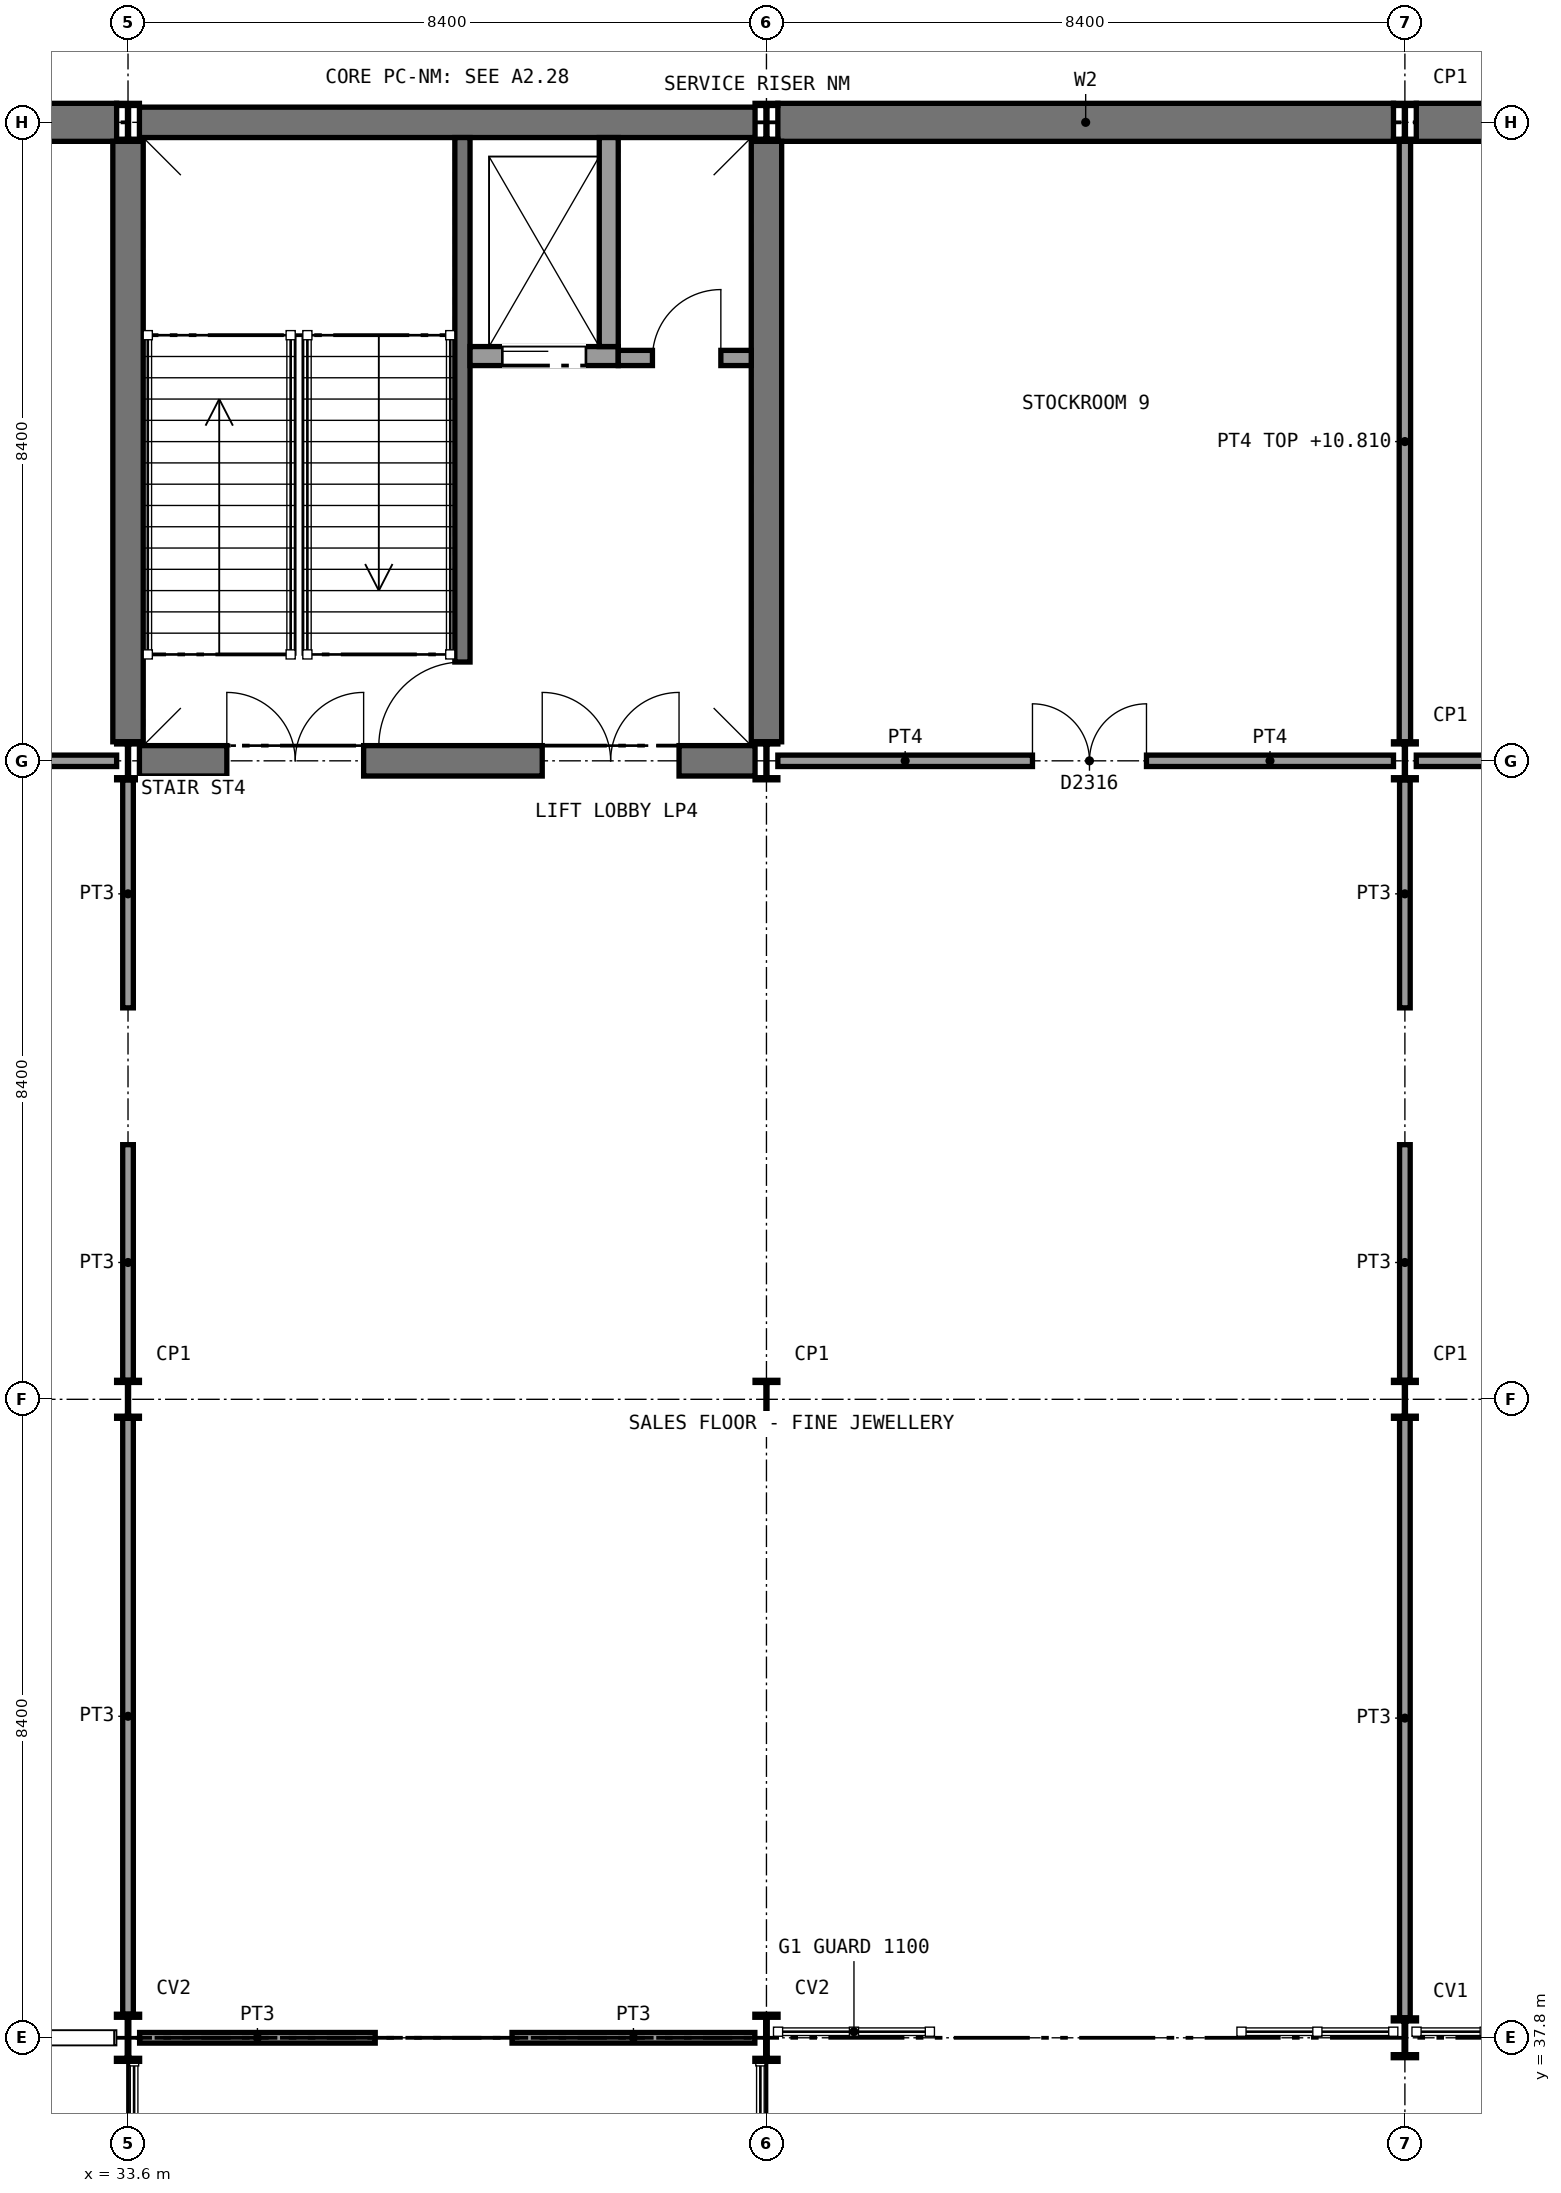
"""IFC4 building model, lengths in metres.
Left out: names, types, materials, properties, quantities, classifications, styles, units other than length and angle.
Written with IfcOpenShell. Run it as: python <this file> out.ifc"""

import sys

from ifc_helpers import new_model, si_unit, direction, frame, frame_2d, origin, origin_2d, place, context, subcontext, project, spatial, rectangle, i_section, extrude, element, fill, save


model = new_model("IFC4")
c1 = context("Model", 3, precision=1e-05, world=origin(), true_north=direction((0.0, 1.0)))
c2 = subcontext(c1, "Body", "Model", "MODEL_VIEW")
j1 = project(units=[si_unit("LENGTHUNIT", "METRE"), si_unit("PLANEANGLEUNIT", "RADIAN")], contexts=[c1])
p1 = place(None, origin())
s1 = spatial("IfcSite", under=j1, at=p1, CompositionType="ELEMENT")
p2 = place(p1, origin())
s2 = spatial("IfcBuilding", under=s1, at=p2, CompositionType="ELEMENT")
p3 = place(p2, frame((0.0, 0.0, 6.0)))
s3 = spatial("IfcBuildingStorey", under=s2, at=p3, CompositionType="ELEMENT", Elevation=6.0)
p4 = place(p3, frame((25.35, 63.0, 0.0), z_axis=(0.0, 0.0, 1.0), x_axis=(1.0, 0.0, 0.0)))
e1 = element("IfcWall", 1, at=p4, inside=s3, PredefinedType="SHEAR", context=c2, shape_type="SweptSolid", body=[
    extrude(rectangle(XDim=8.1, YDim=0.5, at=frame_2d((4.05, 0.0))), origin(), (0.0, 0.0, 1.0), 5.25),
])
p5 = place(p3, frame((42.15, 63.0, 0.0), z_axis=(0.0, 0.0, 1.0), x_axis=(1.0, 0.0, 0.0)))
e2 = element("IfcWall", 2, at=p5, inside=s3, PredefinedType="SHEAR", context=c2, shape_type="SweptSolid", body=[
    extrude(rectangle(XDim=8.1, YDim=0.5, at=frame_2d((4.05, 0.0))), origin(), (0.0, 0.0, 1.0), 5.25),
])
p6 = place(p3, frame((50.55, 63.0, 0.0), z_axis=(0.0, 0.0, 1.0), x_axis=(1.0, 0.0, 0.0)))
e3 = element("IfcWall", 3, at=p6, inside=s3, PredefinedType="SHEAR", context=c2, shape_type="SweptSolid", body=[
    extrude(rectangle(XDim=8.1, YDim=0.5, at=frame_2d((4.05, 0.0))), origin(), (0.0, 0.0, 1.0), 5.25),
])
p7 = place(p3, frame((33.75, 63.0, 0.0), z_axis=(0.0, 0.0, 1.0), x_axis=(1.0, 0.0, 0.0)))
e4 = element("IfcWall", 4, at=p7, inside=s3, PredefinedType="SHEAR", context=c2, shape_type="SweptSolid", body=[
    extrude(rectangle(XDim=8.1, YDim=0.4, at=frame_2d((4.05, 0.0))), origin(), (0.0, 0.0, 1.0), 5.25),
])
p8 = place(p3, frame((33.75, 54.6, 0.0), z_axis=(0.0, 0.0, 1.0), x_axis=(1.0, 0.0, 0.0)))
e5 = element("IfcWall", 5, at=p8, inside=s3, PredefinedType="SHEAR", context=c2, shape_type="SweptSolid", body=[
    extrude(rectangle(XDim=8.1, YDim=0.4, at=frame_2d((4.05, 0.0))), origin(), (0.0, 0.0, 1.0), 5.25),
])
p9 = place(p8, frame((1.15, 0.0, 0.0)))
e6 = element("IfcOpeningElement", 6, at=p9, cuts=e5, PredefinedType="OPENING", context=c2, shape_type="SweptSolid", body=[
    extrude(rectangle(XDim=1.8, YDim=2.1, at=frame_2d((0.9, 1.05))), frame((0.0, 0.21, 0.0), z_axis=(0.0, -1.0, 0.0), x_axis=(1.0, 0.0, 0.0)), (0.0, 0.0, 1.0), 0.42),
])
p10 = place(p8, frame((5.3, 0.0, 0.0)))
e7 = element("IfcOpeningElement", 7, at=p10, cuts=e5, PredefinedType="OPENING", context=c2, shape_type="SweptSolid", body=[
    extrude(rectangle(XDim=1.8, YDim=2.1, at=frame_2d((0.9, 1.05))), frame((0.0, 0.21, 0.0), z_axis=(0.0, -1.0, 0.0), x_axis=(1.0, 0.0, 0.0)), (0.0, 0.0, 1.0), 0.42),
])
for number, where, z_axis, x_axis in (
    (8, (33.6, 54.85, 0.0), (0.0, 0.0, 1.0), (0.0, 1.0, 0.0)),
    (9, (42.0, 54.85, 0.0), (0.0, 0.0, 1.0), (0.0, 1.0, 0.0)),
):
    element("IfcWall", number, at=place(p3, frame(where, z_axis=z_axis, x_axis=x_axis)), inside=s3, PredefinedType="SHEAR", context=c2, shape_type="SweptSolid", body=[
        extrude(rectangle(XDim=7.9, YDim=0.4, at=frame_2d((3.95, 0.0))), origin(), (0.0, 0.0, 1.0), 5.25),
    ])
p11 = place(p3, frame((33.6, 37.8, 0.0), z_axis=(0.0, 0.0, 1.0), x_axis=(1.0, 0.0, 0.0)))
e10 = element("IfcColumn", 10, at=p11, inside=s3, PredefinedType="COLUMN", context=c2, shape_type="SweptSolid", body=[
    extrude(i_section(OverallWidth=0.305, OverallDepth=0.62, WebThickness=0.021, FlangeThickness=0.04, FilletRadius=0.027, at=origin_2d()), origin(), (0.0, 0.0, 1.0), 5.4),
])
for number, where, z_axis, x_axis in (
    (11, (33.6, 46.2, 0.0), (0.0, 0.0, 1.0), (1.0, 0.0, 0.0)),
    (12, (33.6, 54.6, 0.0), (0.0, 0.0, 1.0), (1.0, 0.0, 0.0)),
    (13, (33.6, 63.0, 0.0), (0.0, 0.0, 1.0), (1.0, 0.0, 0.0)),
):
    element("IfcColumn", number, at=place(p3, frame(where, z_axis=z_axis, x_axis=x_axis)), inside=s3, PredefinedType="COLUMN", context=c2, shape_type="SweptSolid", body=[
        extrude(i_section(OverallWidth=0.3, OverallDepth=0.5, WebThickness=0.014, FlangeThickness=0.028, FilletRadius=0.027, at=origin_2d()), origin(), (0.0, 0.0, 1.0), 5.4),
    ])
p12 = place(p3, frame((42.0, 37.8, 0.0), z_axis=(0.0, 0.0, 1.0), x_axis=(1.0, 0.0, 0.0)))
e14 = element("IfcColumn", 14, at=p12, inside=s3, PredefinedType="COLUMN", context=c2, shape_type="SweptSolid", body=[
    extrude(i_section(OverallWidth=0.305, OverallDepth=0.62, WebThickness=0.021, FlangeThickness=0.04, FilletRadius=0.027, at=origin_2d()), origin(), (0.0, 0.0, 1.0), 5.4),
])
for number, where, z_axis, x_axis in (
    (15, (42.0, 46.2, 0.0), (0.0, 0.0, 1.0), (1.0, 0.0, 0.0)),
    (16, (42.0, 54.6, 0.0), (0.0, 0.0, 1.0), (1.0, 0.0, 0.0)),
    (17, (42.0, 63.0, 0.0), (0.0, 0.0, 1.0), (1.0, 0.0, 0.0)),
):
    element("IfcColumn", number, at=place(p3, frame(where, z_axis=z_axis, x_axis=x_axis)), inside=s3, PredefinedType="COLUMN", context=c2, shape_type="SweptSolid", body=[
        extrude(i_section(OverallWidth=0.3, OverallDepth=0.5, WebThickness=0.014, FlangeThickness=0.028, FilletRadius=0.027, at=origin_2d()), origin(), (0.0, 0.0, 1.0), 5.4),
    ])
p13 = place(p3, frame((50.4, 37.8, 0.0), z_axis=(0.0, 0.0, 1.0), x_axis=(1.0, 0.0, 0.0)))
e18 = element("IfcColumn", 18, at=p13, inside=s3, PredefinedType="COLUMN", context=c2, shape_type="SweptSolid", body=[
    extrude(i_section(OverallWidth=0.306, OverallDepth=0.524, WebThickness=0.021, FlangeThickness=0.04, FilletRadius=0.027, at=origin_2d()), origin(), (0.0, 0.0, 1.0), 5.4),
])
for number, where, z_axis, x_axis in (
    (19, (50.4, 46.2, 0.0), (0.0, 0.0, 1.0), (1.0, 0.0, 0.0)),
    (20, (50.4, 54.6, 0.0), (0.0, 0.0, 1.0), (1.0, 0.0, 0.0)),
    (21, (50.4, 63.0, 0.0), (0.0, 0.0, 1.0), (1.0, 0.0, 0.0)),
):
    element("IfcColumn", number, at=place(p3, frame(where, z_axis=z_axis, x_axis=x_axis)), inside=s3, PredefinedType="COLUMN", context=c2, shape_type="SweptSolid", body=[
        extrude(i_section(OverallWidth=0.3, OverallDepth=0.5, WebThickness=0.014, FlangeThickness=0.028, FilletRadius=0.027, at=origin_2d()), origin(), (0.0, 0.0, 1.0), 5.4),
    ])
p14 = place(p3, frame((25.35, 54.6, 0.0), z_axis=(0.0, 0.0, 1.0), x_axis=(1.0, 0.0, 0.0)))
e22 = element("IfcWall", 22, at=p14, inside=s3, PredefinedType="SOLIDWALL", context=c2, shape_type="SweptSolid", body=[
    extrude(rectangle(XDim=8.1, YDim=0.15, at=frame_2d((4.05, 0.0))), origin(), (0.0, 0.0, 1.0), 4.92),
])
p15 = place(p14, frame((3.35, 0.0, 0.0)))
e23 = element("IfcOpeningElement", 23, at=p15, cuts=e22, PredefinedType="OPENING", context=c2, shape_type="SweptSolid", body=[
    extrude(rectangle(XDim=1.5, YDim=2.1, at=frame_2d((0.75, 1.05))), frame((0.0, 0.085, 0.0), z_axis=(0.0, -1.0, 0.0), x_axis=(1.0, 0.0, 0.0)), (0.0, 0.0, 1.0), 0.17),
])
p16 = place(p3, frame((50.4, 54.85, 0.0), z_axis=(0.0, 0.0, 1.0), x_axis=(0.0, 1.0, 0.0)))
e24 = element("IfcWall", 24, at=p16, inside=s3, PredefinedType="SOLIDWALL", context=c2, shape_type="SweptSolid", body=[
    extrude(rectangle(XDim=7.9, YDim=0.15, at=frame_2d((3.95, 0.0))), origin(), (0.0, 0.0, 1.0), 4.81),
])
p17 = place(p3, frame((42.15, 54.6, 0.0), z_axis=(0.0, 0.0, 1.0), x_axis=(1.0, 0.0, 0.0)))
e25 = element("IfcWall", 25, at=p17, inside=s3, PredefinedType="SOLIDWALL", context=c2, shape_type="SweptSolid", body=[
    extrude(rectangle(XDim=8.1, YDim=0.15, at=frame_2d((4.05, 0.0))), origin(), (0.0, 0.0, 1.0), 4.92),
])
p18 = place(p17, frame((3.35, 0.0, 0.0)))
e26 = element("IfcOpeningElement", 26, at=p18, cuts=e25, PredefinedType="OPENING", context=c2, shape_type="SweptSolid", body=[
    extrude(rectangle(XDim=1.5, YDim=2.1, at=frame_2d((0.75, 1.05))), frame((0.0, 0.085, 0.0), z_axis=(0.0, -1.0, 0.0), x_axis=(1.0, 0.0, 0.0)), (0.0, 0.0, 1.0), 0.17),
])
p19 = place(p3, frame((50.55, 54.6, 0.0), z_axis=(0.0, 0.0, 1.0), x_axis=(1.0, 0.0, 0.0)))
e27 = element("IfcWall", 27, at=p19, inside=s3, PredefinedType="SOLIDWALL", context=c2, shape_type="SweptSolid", body=[
    extrude(rectangle(XDim=8.1, YDim=0.15, at=frame_2d((4.05, 0.0))), origin(), (0.0, 0.0, 1.0), 4.92),
])
p20 = place(p19, frame((3.35, 0.0, 0.0)))
e28 = element("IfcOpeningElement", 28, at=p20, cuts=e27, PredefinedType="OPENING", context=c2, shape_type="SweptSolid", body=[
    extrude(rectangle(XDim=1.5, YDim=2.1, at=frame_2d((0.75, 1.05))), frame((0.0, 0.085, 0.0), z_axis=(0.0, -1.0, 0.0), x_axis=(1.0, 0.0, 0.0)), (0.0, 0.0, 1.0), 0.17),
])
p21 = place(p3, frame((33.6, 38.11, 0.0), z_axis=(0.0, 0.0, 1.0), x_axis=(0.0, 1.0, 0.0)))
e29 = element("IfcWall", 29, at=p21, inside=s3, PredefinedType="PARTITIONING", context=c2, shape_type="SweptSolid", body=[
    extrude(rectangle(XDim=7.84, YDim=0.14, at=frame_2d((3.92, 0.0))), origin(), (0.0, 0.0, 1.0), 4.81),
])
p22 = place(p3, frame((33.6, 46.45, 0.0), z_axis=(0.0, 0.0, 1.0), x_axis=(0.0, 1.0, 0.0)))
e30 = element("IfcWall", 30, at=p22, inside=s3, PredefinedType="PARTITIONING", context=c2, shape_type="SweptSolid", body=[
    extrude(rectangle(XDim=3.1, YDim=0.14, at=frame_2d((1.55, 0.0))), origin(), (0.0, 0.0, 1.0), 4.81),
])
p23 = place(p3, frame((33.6, 51.35, 0.0), z_axis=(0.0, 0.0, 1.0), x_axis=(0.0, 1.0, 0.0)))
e31 = element("IfcWall", 31, at=p23, inside=s3, PredefinedType="PARTITIONING", context=c2, shape_type="SweptSolid", body=[
    extrude(rectangle(XDim=3.0, YDim=0.14, at=frame_2d((1.5, 0.0))), origin(), (0.0, 0.0, 1.0), 4.81),
])
p24 = place(p3, frame((50.4, 38.062, 0.0), z_axis=(0.0, 0.0, 1.0), x_axis=(0.0, 1.0, 0.0)))
e32 = element("IfcWall", 32, at=p24, inside=s3, PredefinedType="PARTITIONING", context=c2, shape_type="SweptSolid", body=[
    extrude(rectangle(XDim=7.888, YDim=0.14, at=frame_2d((3.944, 0.0))), origin(), (0.0, 0.0, 1.0), 4.81),
])
p25 = place(p3, frame((50.4, 46.45, 0.0), z_axis=(0.0, 0.0, 1.0), x_axis=(0.0, 1.0, 0.0)))
e33 = element("IfcWall", 33, at=p25, inside=s3, PredefinedType="PARTITIONING", context=c2, shape_type="SweptSolid", body=[
    extrude(rectangle(XDim=3.1, YDim=0.14, at=frame_2d((1.55, 0.0))), origin(), (0.0, 0.0, 1.0), 4.81),
])
p26 = place(p3, frame((50.4, 51.35, 0.0), z_axis=(0.0, 0.0, 1.0), x_axis=(0.0, 1.0, 0.0)))
e34 = element("IfcWall", 34, at=p26, inside=s3, PredefinedType="PARTITIONING", context=c2, shape_type="SweptSolid", body=[
    extrude(rectangle(XDim=3.0, YDim=0.14, at=frame_2d((1.5, 0.0))), origin(), (0.0, 0.0, 1.0), 4.81),
])
p27 = place(p3, frame((33.753, 37.8, 0.0), z_axis=(0.0, 0.0, 1.0), x_axis=(1.0, 0.0, 0.0)))
e35 = element("IfcWall", 35, at=p27, inside=s3, PredefinedType="PARTITIONING", context=c2, shape_type="SweptSolid", body=[
    extrude(rectangle(XDim=3.1, YDim=0.14, at=frame_2d((1.55, 0.0))), origin(), (0.0, 0.0, 1.0), 4.81),
])
p28 = place(p3, frame((38.653, 37.8, 0.0), z_axis=(0.0, 0.0, 1.0), x_axis=(1.0, 0.0, 0.0)))
e36 = element("IfcWall", 36, at=p28, inside=s3, PredefinedType="PARTITIONING", context=c2, shape_type="SweptSolid", body=[
    extrude(rectangle(XDim=3.195, YDim=0.14, at=frame_2d((1.597, 0.0))), origin(), (0.0, 0.0, 1.0), 4.81),
])
p29 = place(p3, frame((38.0, 62.8, 0.0), z_axis=(0.0, 0.0, 1.0), x_axis=(0.0, -1.0, 0.0)))
e37 = element("IfcWall", 37, at=p29, inside=s3, PredefinedType="SHEAR", context=c2, shape_type="SweptSolid", body=[
    extrude(rectangle(XDim=8.0, YDim=0.2, at=frame_2d((4.0, 0.0))), origin(), (0.0, 0.0, 1.0), 5.25),
])
p30 = place(p29, frame((6.9, 0.0, 0.0)))
e38 = element("IfcOpeningElement", 38, at=p30, cuts=e37, PredefinedType="OPENING", context=c2, shape_type="SweptSolid", body=[
    extrude(rectangle(XDim=1.11, YDim=2.1, at=frame_2d((0.555, 1.05))), frame((0.0, 0.11, 0.0), z_axis=(0.0, -1.0, 0.0), x_axis=(1.0, 0.0, 0.0)), (0.0, 0.0, 1.0), 0.22),
])
p31 = place(p3, frame((38.1, 59.925, 0.0), z_axis=(0.0, 0.0, 1.0), x_axis=(1.0, 0.0, 0.0)))
e39 = element("IfcWall", 39, at=p31, inside=s3, PredefinedType="SOLIDWALL", context=c2, shape_type="SweptSolid", body=[
    extrude(rectangle(XDim=1.95, YDim=0.25, at=frame_2d((0.975, 0.0))), origin(), (0.0, 0.0, 1.0), 5.4),
])
p32 = place(p31, frame((0.425, 0.0, 0.0)))
e40 = element("IfcOpeningElement", 40, at=p32, cuts=e39, PredefinedType="OPENING", context=c2, shape_type="SweptSolid", body=[
    extrude(rectangle(XDim=1.1, YDim=2.1, at=frame_2d((0.55, 1.05))), frame((0.0, 0.135, 0.0), z_axis=(0.0, -1.0, 0.0), x_axis=(1.0, 0.0, 0.0)), (0.0, 0.0, 1.0), 0.27),
])
p33 = place(p3, frame((39.925, 62.8, 0.0), z_axis=(0.0, 0.0, 1.0), x_axis=(0.0, -1.0, 0.0)))
e41 = element("IfcWall", 41, at=p33, inside=s3, PredefinedType="SOLIDWALL", context=c2, shape_type="SweptSolid", body=[
    extrude(rectangle(XDim=2.75, YDim=0.25, at=frame_2d((1.375, 0.0))), origin(), (0.0, 0.0, 1.0), 5.4),
])
p34 = place(p3, frame((40.05, 59.9, 0.0), z_axis=(0.0, 0.0, 1.0), x_axis=(1.0, 0.0, 0.0)))
e42 = element("IfcWall", 42, at=p34, inside=s3, PredefinedType="PARTITIONING", context=c2, shape_type="SweptSolid", body=[
    extrude(rectangle(XDim=1.75, YDim=0.2, at=frame_2d((0.875, 0.0))), origin(), (0.0, 0.0, 1.0), 5.25),
])
p35 = place(p34, frame((0.45, 0.0, 0.0)))
e43 = element("IfcOpeningElement", 43, at=p35, cuts=e42, PredefinedType="OPENING", context=c2, shape_type="SweptSolid", body=[
    extrude(rectangle(XDim=0.9, YDim=2.1, at=frame_2d((0.45, 1.05))), frame((0.0, 0.11, 0.0), z_axis=(0.0, -1.0, 0.0), x_axis=(1.0, 0.0, 0.0)), (0.0, 0.0, 1.0), 0.22),
])
p36 = place(p18, origin())
e44 = element("IfcDoor", 44, at=p36, inside=s3, OperationType="DOUBLE_DOOR_SINGLE_SWING", PredefinedType="DOOR", context=c2, shape_type="SweptSolid", body=[
    extrude(rectangle(XDim=1.5, YDim=2.1, at=frame_2d((0.75, 1.05))), frame((0.0, 0.025, 0.0), z_axis=(0.0, -1.0, 0.0), x_axis=(1.0, 0.0, 0.0)), (0.0, 0.0, 1.0), 0.05),
])
fill(e26, e44)
p37 = place(p30, frame((1.1, 0.0, 0.0), z_axis=(0.0, 0.0, 1.0), x_axis=(-1.0, 0.0, 0.0)))
e45 = element("IfcDoor", 45, at=p37, inside=s3, OperationType="SINGLE_SWING_LEFT", PredefinedType="DOOR", context=c2, shape_type="SweptSolid", body=[
    extrude(rectangle(XDim=1.1, YDim=2.1, at=frame_2d((0.55, 1.05))), frame((0.0, 0.025, 0.0), z_axis=(0.0, -1.0, 0.0), x_axis=(1.0, 0.0, 0.0)), (0.0, 0.0, 1.0), 0.05),
])
fill(e38, e45)
p38 = place(p32, frame((1.1, 0.0, 0.0), z_axis=(0.0, 0.0, 1.0), x_axis=(-1.0, 0.0, 0.0)))
e46 = element("IfcDoor", 46, at=p38, inside=s3, OperationType="SLIDING_TO_RIGHT", PredefinedType="DOOR", context=c2, shape_type="SweptSolid", body=[
    extrude(rectangle(XDim=1.1, YDim=2.1, at=frame_2d((0.55, 1.05))), frame((0.0, 0.025, 0.0), z_axis=(0.0, -1.0, 0.0), x_axis=(1.0, 0.0, 0.0)), (0.0, 0.0, 1.0), 0.05),
])
fill(e40, e46)
p39 = place(p35, origin())
e47 = element("IfcDoor", 47, at=p39, inside=s3, OperationType="SINGLE_SWING_RIGHT", PredefinedType="DOOR", context=c2, shape_type="SweptSolid", body=[
    extrude(rectangle(XDim=0.9, YDim=2.1, at=frame_2d((0.45, 1.05))), frame((0.0, 0.025, 0.0), z_axis=(0.0, -1.0, 0.0), x_axis=(1.0, 0.0, 0.0)), (0.0, 0.0, 1.0), 0.05),
])
fill(e43, e47)
p40 = place(p9, origin())
e48 = element("IfcDoor", 48, at=p40, inside=s3, OperationType="DOUBLE_DOOR_SINGLE_SWING", PredefinedType="DOOR", context=c2, shape_type="SweptSolid", body=[
    extrude(rectangle(XDim=1.8, YDim=2.1, at=frame_2d((0.9, 1.05))), frame((0.0, 0.025, 0.0), z_axis=(0.0, -1.0, 0.0), x_axis=(1.0, 0.0, 0.0)), (0.0, 0.0, 1.0), 0.05),
])
fill(e6, e48)
p41 = place(p10, origin())
e49 = element("IfcDoor", 49, at=p41, inside=s3, OperationType="DOUBLE_DOOR_SINGLE_SWING", PredefinedType="DOOR", context=c2, shape_type="SweptSolid", body=[
    extrude(rectangle(XDim=1.8, YDim=2.1, at=frame_2d((0.9, 1.05))), frame((0.0, 0.025, 0.0), z_axis=(0.0, -1.0, 0.0), x_axis=(1.0, 0.0, 0.0)), (0.0, 0.0, 1.0), 0.05),
])
fill(e7, e49)
save(model, sys.argv[1])
